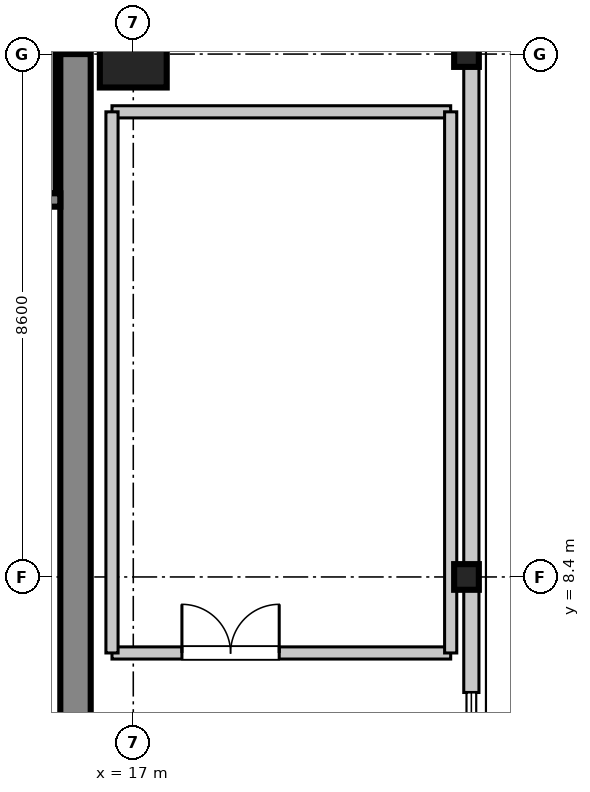
"""IFC4 building model, lengths in metres.
Left out: names, types, materials, properties, quantities, classifications, styles, units other than length and angle.
Written with IfcOpenShell. Run it as: python <this file> out.ifc"""

import sys

from ifc_helpers import new_model, si_unit, direction, frame, frame_2d, origin, origin_2d, place, context, subcontext, project, spatial, rectangle, i_section, extrude, source, transform, mapped, element, fill, save


model = new_model("IFC4")
c1 = context("Model", 3, precision=1e-05, world=origin(), true_north=direction((0.0, 1.0)))
c2 = subcontext(c1, "Body", "Model", "MODEL_VIEW")
j1 = project(units=[si_unit("LENGTHUNIT", "METRE"), si_unit("PLANEANGLEUNIT", "RADIAN")], contexts=[c1])
p1 = place(None, origin())
s1 = spatial("IfcSite", under=j1, at=p1, CompositionType="ELEMENT")
p2 = place(p1, origin())
s2 = spatial("IfcBuilding", under=s1, at=p2, CompositionType="ELEMENT")
p3 = place(p2, frame((0.0, 0.0, 200.1)))
s3 = spatial("IfcBuildingStorey", under=s2, at=p3, CompositionType="ELEMENT", Elevation=200.1)
m1 = source(origin(), c2, "Body", "SweptSolid", [
    extrude(rectangle(XDim=1.1, YDim=1.1, at=origin_2d()), origin(), (0.0, 0.0, 1.0), 4.755),
])
p4 = place(p3, frame((17.0, 17.0, 0.0), z_axis=(0.0, 0.0, 1.0), x_axis=(1.0, 0.0, 0.0)))
e1 = element("IfcColumn", 1, at=p4, inside=s3, PredefinedType="COLUMN", context=c2, shape_type="MappedRepresentation", body=[
    mapped(m1, transform((0.0, 0.0, 0.0), scale=1.0)),
])
m2 = source(origin(), c2, "Body", "SweptSolid", [
    extrude(i_section(OverallWidth=0.406, OverallDepth=0.422, WebThickness=0.019, FlangeThickness=0.03, at=origin_2d()), origin(), (0.0, 0.0, 1.0), 4.861),
])
for number, where, z_axis, x_axis in (
    (2, (22.48, 8.4, 0.0), (0.288, 0.0, 0.958), (0.0, 1.0, 0.0)),
    (3, (22.48, 17.0, 0.0), (0.288, 0.0, 0.958), (0.0, 1.0, 0.0)),
):
    element("IfcColumn", number, at=place(p3, frame(where, z_axis=z_axis, x_axis=x_axis)), inside=s3, PredefinedType="COLUMN", context=c2, shape_type="MappedRepresentation", body=[
        mapped(m2, transform((0.0, 0.0, 0.0), scale=1.0)),
    ])
m3 = source(origin(), c2, "Body", "SweptSolid", [
    extrude(rectangle(XDim=11.6, YDim=0.5, at=frame_2d((5.8, 0.0))), origin(), (0.0, 0.0, 1.0), 4.51),
])
p5 = place(p3, frame((16.05, 5.4, 0.0), z_axis=(0.0, 0.0, 1.0), x_axis=(0.0, 1.0, 0.0)))
e4 = element("IfcWall", 4, at=p5, inside=s3, PredefinedType="SHEAR", context=c2, shape_type="MappedRepresentation", body=[
    mapped(m3, transform((0.0, 0.0, 0.0), scale=1.0)),
])
m4 = source(origin(), c2, "Body", "SweptSolid", [
    extrude(rectangle(XDim=2.6, YDim=0.22, at=frame_2d((1.3, 0.0))), origin(), (0.0, 0.0, 1.0), 4.51),
])
p6 = place(p3, frame((15.62, 14.71, 0.0), z_axis=(0.0, 0.0, 1.0), x_axis=(0.0, 1.0, 0.0)))
e5 = element("IfcWall", 5, at=p6, inside=s3, PredefinedType="SHEAR", context=c2, shape_type="MappedRepresentation", body=[
    mapped(m4, transform((0.0, 0.0, 0.0), scale=1.0)),
])
m5 = source(origin(), c2, "Body", "SweptSolid", [
    extrude(rectangle(XDim=2.33, YDim=0.22, at=frame_2d((1.165, 0.0))), origin(), (0.0, 0.0, 1.0), 4.51),
])
p7 = place(p3, frame((13.47, 14.6, 0.0), z_axis=(0.0, 0.0, 1.0), x_axis=(1.0, 0.0, 0.0)))
e6 = element("IfcWall", 6, at=p7, inside=s3, PredefinedType="SHEAR", context=c2, shape_type="MappedRepresentation", body=[
    mapped(m5, transform((0.0, 0.0, 0.0), scale=1.0)),
])
m6 = source(origin(), c2, "Body", "SweptSolid", [
    extrude(rectangle(XDim=13.26, YDim=0.25, at=frame_2d((6.63, 0.0))), origin(), (0.0, 0.0, 1.0), 3.99),
])
p8 = place(p3, frame((22.56, 6.5, 0.0), z_axis=(0.0, 0.0, 1.0), x_axis=(0.0, 1.0, 0.0)))
e7 = element("IfcWall", 7, at=p8, inside=s3, PredefinedType="STANDARD", context=c2, shape_type="MappedRepresentation", body=[
    mapped(m6, transform((0.0, 0.0, 0.0), scale=1.0)),
])
m7 = source(origin(), c2, "Body", "SweptSolid", [
    extrude(rectangle(XDim=5.57, YDim=0.2, at=frame_2d((2.785, 0.0))), origin(), (0.0, 0.0, 1.0), 3.4),
])
p9 = place(p3, frame((16.65, 7.15, 0.0), z_axis=(0.0, 0.0, 1.0), x_axis=(1.0, 0.0, 0.0)))
e8 = element("IfcWall", 8, at=p9, inside=s3, PredefinedType="PARTITIONING", context=c2, shape_type="MappedRepresentation", body=[
    mapped(m7, transform((0.0, 0.0, 0.0), scale=1.0)),
])
p10 = place(p9, frame((1.15, 0.0, 0.0)))
e9 = element("IfcOpeningElement", 9, at=p10, cuts=e8, PredefinedType="OPENING", context=c2, shape_type="SweptSolid", body=[
    extrude(rectangle(XDim=1.6, YDim=2.15, at=frame_2d((0.8, 1.075))), frame((0.0, 0.11, 0.0), z_axis=(0.0, -1.0, 0.0), x_axis=(1.0, 0.0, 0.0)), (0.0, 0.0, 1.0), 0.22),
])
p11 = place(p3, frame((16.65, 16.05, 0.0), z_axis=(0.0, 0.0, 1.0), x_axis=(1.0, 0.0, 0.0)))
e10 = element("IfcWall", 10, at=p11, inside=s3, PredefinedType="PARTITIONING", context=c2, shape_type="MappedRepresentation", body=[
    mapped(m7, transform((0.0, 0.0, 0.0), scale=1.0)),
])
m8 = source(origin(), c2, "Body", "SweptSolid", [
    extrude(rectangle(XDim=8.9, YDim=0.2, at=frame_2d((4.45, 0.0))), origin(), (0.0, 0.0, 1.0), 3.4),
])
for number, where, z_axis, x_axis in (
    (11, (16.65, 7.15, 0.0), (0.0, 0.0, 1.0), (0.0, 1.0, 0.0)),
    (12, (22.22, 7.15, 0.0), (0.0, 0.0, 1.0), (0.0, 1.0, 0.0)),
):
    element("IfcWall", number, at=place(p3, frame(where, z_axis=z_axis, x_axis=x_axis)), inside=s3, PredefinedType="PARTITIONING", context=c2, shape_type="MappedRepresentation", body=[
        mapped(m8, transform((0.0, 0.0, 0.0), scale=1.0)),
    ])
m9 = source(origin(), c2, "Body", "SweptSolid", [
    extrude(rectangle(XDim=1.6, YDim=2.15, at=frame_2d((0.8, 1.075))), frame((0.0, 0.025, 0.0), z_axis=(0.0, -1.0, 0.0), x_axis=(1.0, 0.0, 0.0)), (0.0, 0.0, 1.0), 0.05),
])
p12 = place(p10, origin())
e13 = element("IfcDoor", 13, at=p12, inside=s3, OperationType="DOUBLE_DOOR_SINGLE_SWING", PredefinedType="DOOR", context=c2, shape_type="MappedRepresentation", body=[
    mapped(m9, transform((0.0, 0.0, 0.0), scale=1.0)),
])
fill(e9, e13)
save(model, sys.argv[1])
